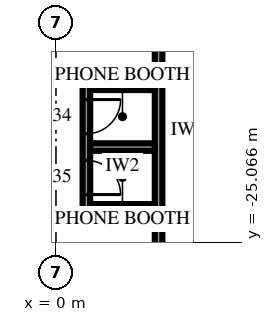
"""IFC4 building model, lengths in metres.
Left out: names, types, materials, properties, quantities, classifications, styles, units other than length and angle.
Written with IfcOpenShell. Run it as: python <this file> out.ifc"""

import sys

from ifc_helpers import new_model, si_unit, direction, frame, frame_2d, origin, place, context, subcontext, project, spatial, rectangle, extrude, element, fill, save


model = new_model("IFC4")
c1 = context("Model", 3, precision=1e-05, world=origin(), true_north=direction((0.0, 1.0)))
c2 = subcontext(c1, "Body", "Model", "MODEL_VIEW")
j1 = project(units=[si_unit("LENGTHUNIT", "METRE"), si_unit("PLANEANGLEUNIT", "RADIAN")], contexts=[c1])
p1 = place(None, origin())
s1 = spatial("IfcSite", under=j1, at=p1, CompositionType="ELEMENT")
p2 = place(p1, origin())
s2 = spatial("IfcBuilding", under=s1, at=p2, CompositionType="ELEMENT")
p3 = place(p2, frame((0.0, 0.0, 378.7)))
s3 = spatial("IfcBuildingStorey", under=s2, at=p3, CompositionType="ELEMENT", Elevation=378.7)
p4 = place(p3, frame((2.7, -17.7, 0.0), z_axis=(0.0, 0.0, 1.0), x_axis=(0.0, -1.0, 0.0)))
e1 = element("IfcWall", 1, at=p4, inside=s3, PredefinedType="PARTITIONING", context=c2, shape_type="SweptSolid", body=[
    extrude(rectangle(XDim=8.85, YDim=0.2, at=frame_2d((4.425, 0.0))), origin(), (0.0, 0.0, 1.0), 4.0),
])
p5 = place(p3, frame((0.8, -20.867, 0.0), z_axis=(0.0, 0.0, 1.0), x_axis=(0.0, -1.0, 0.0)))
e2 = element("IfcWall", 2, at=p5, inside=s3, PredefinedType="PARTITIONING", context=c2, shape_type="SweptSolid", body=[
    extrude(rectangle(XDim=3.4, YDim=0.2, at=frame_2d((1.7, 0.0))), origin(), (0.0, 0.0, 1.0), 4.0),
])
p6 = place(p5, frame((0.45, 0.0, 0.0)))
e3 = element("IfcOpeningElement", 3, at=p6, cuts=e2, PredefinedType="OPENING", context=c2, shape_type="SweptSolid", body=[
    extrude(rectangle(XDim=0.9, YDim=2.2, at=frame_2d((0.45, 1.1))), frame((0.0, 0.11, 0.0), z_axis=(0.0, -1.0, 0.0), x_axis=(1.0, 0.0, 0.0)), (0.0, 0.0, 1.0), 0.22),
])
p7 = place(p5, frame((2.05, 0.0, 0.0)))
e4 = element("IfcOpeningElement", 4, at=p7, cuts=e2, PredefinedType="OPENING", context=c2, shape_type="SweptSolid", body=[
    extrude(rectangle(XDim=0.9, YDim=2.2, at=frame_2d((0.45, 1.1))), frame((0.0, 0.11, 0.0), z_axis=(0.0, -1.0, 0.0), x_axis=(1.0, 0.0, 0.0)), (0.0, 0.0, 1.0), 0.22),
])
for number, where, z_axis, x_axis in (
    (5, (2.6, -20.968, 0.0), (0.0, 0.0, 1.0), (-1.0, 0.0, 0.0)),
    (6, (2.6, -22.567, 0.0), (0.0, 0.0, 1.0), (-1.0, 0.0, 0.0)),
    (7, (2.6, -24.167, 0.0), (0.0, 0.0, 1.0), (-1.0, 0.0, 0.0)),
):
    element("IfcWall", number, at=place(p3, frame(where, z_axis=z_axis, x_axis=x_axis)), inside=s3, PredefinedType="PARTITIONING", context=c2, shape_type="SweptSolid", body=[
        extrude(rectangle(XDim=1.7, YDim=0.2, at=frame_2d((0.85, 0.0))), origin(), (0.0, 0.0, 1.0), 4.0),
    ])
p8 = place(p6, origin())
e8 = element("IfcDoor", 8, at=p8, inside=s3, OperationType="SINGLE_SWING_RIGHT", PredefinedType="DOOR", context=c2, shape_type="SweptSolid", body=[
    extrude(rectangle(XDim=0.9, YDim=2.2, at=frame_2d((0.45, 1.1))), frame((0.0, 0.025, 0.0), z_axis=(0.0, -1.0, 0.0), x_axis=(1.0, 0.0, 0.0)), (0.0, 0.0, 1.0), 0.05),
])
fill(e3, e8)
p9 = place(p7, origin())
e9 = element("IfcDoor", 9, at=p9, inside=s3, OperationType="SINGLE_SWING_LEFT", PredefinedType="DOOR", context=c2, shape_type="SweptSolid", body=[
    extrude(rectangle(XDim=0.9, YDim=2.2, at=frame_2d((0.45, 1.1))), frame((0.0, 0.025, 0.0), z_axis=(0.0, -1.0, 0.0), x_axis=(1.0, 0.0, 0.0)), (0.0, 0.0, 1.0), 0.05),
])
fill(e4, e9)
save(model, sys.argv[1])
